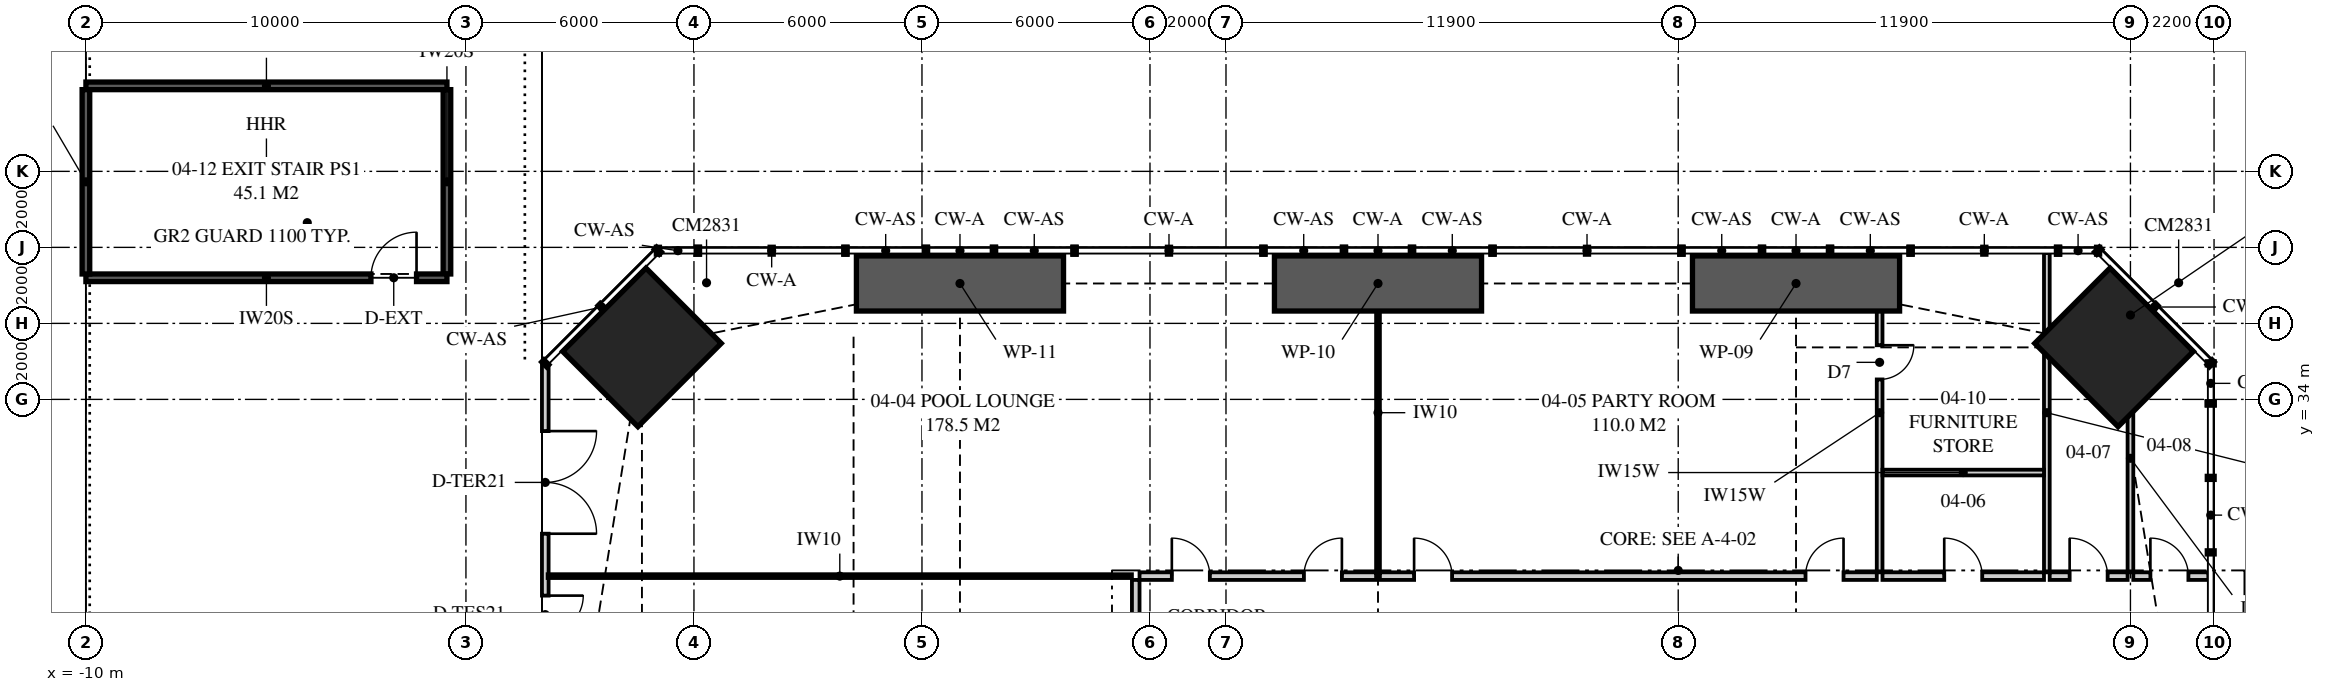
"""IFC4 building model, lengths in metres.
Left out: names, types, materials, properties, quantities, classifications, styles, units other than length and angle.
Written with IfcOpenShell. Run it as: python <this file> out.ifc"""

import sys

from ifc_helpers import new_model, si_unit, direction, frame, frame_2d, origin, origin_2d, place, context, subcontext, project, spatial, polyline, rectangle, outline, extrude, element, fill, save


model = new_model("IFC4")
c1 = context("Model", 3, precision=1e-05, world=origin(), true_north=direction((0.0, 1.0)))
c2 = subcontext(c1, "Body", "Model", "MODEL_VIEW")
j1 = project(units=[si_unit("LENGTHUNIT", "METRE"), si_unit("PLANEANGLEUNIT", "RADIAN")], contexts=[c1])
p1 = place(None, origin())
s1 = spatial("IfcSite", under=j1, at=p1, CompositionType="ELEMENT")
p2 = place(p1, origin())
s2 = spatial("IfcBuilding", under=s1, at=p2, CompositionType="ELEMENT")
p3 = place(p2, frame((0.0, 0.0, 21.0)))
s3 = spatial("IfcBuildingStorey", under=s2, at=p3, CompositionType="ELEMENT", Elevation=21.0)
for number, where, z_axis, x_axis in (
    (1, (43.369, 35.369, 0.0), (0.0, 0.0, 1.0), (-0.707, -0.707, 0.0)),
    (2, (4.631, 35.369, 0.0), (0.0, 0.0, 1.0), (0.707, -0.707, 0.0)),
):
    element("IfcColumn", number, at=place(p3, frame(where, z_axis=z_axis, x_axis=x_axis)), inside=s3, PredefinedType="COLUMN", context=c2, shape_type="SweptSolid", body=[
        extrude(rectangle(XDim=2.8, YDim=3.1, at=origin_2d()), origin(), (0.0, 0.0, 1.0), 3.35),
    ])
p4 = place(p3, frame((2.087, 34.949, 0.0), z_axis=(0.0, 0.0, 1.0), x_axis=(0.0, -1.0, 0.0)))
e3 = element("IfcWall", 3, at=p4, inside=s3, PredefinedType="SOLIDWALL", context=c2, shape_type="SweptSolid", body=[
    extrude(outline(polyline([(0.0, 0.0), (31.897, 0.0), (31.897, 3.11), (22.167, 3.11), (22.167, 2.15), (22.074, 2.15), (22.074, 3.11), (21.949, 3.11), (21.949, 2.15), (9.949, 2.15), (9.949, 3.11), (9.823, 3.11), (9.823, 2.15), (9.73, 2.15), (9.73, 3.11), (0.0, 3.11), (0.0, 0.0)])), frame((0.0, 0.087, 0.0), z_axis=(0.0, -1.0, 0.0), x_axis=(1.0, 0.0, 0.0)), (0.0, 0.0, 1.0), 0.175),
])
p5 = place(p4, frame((1.783, 0.0, 0.0)))
e4 = element("IfcOpeningElement", 4, at=p5, cuts=e3, PredefinedType="OPENING", context=c2, shape_type="SweptSolid", body=[
    extrude(rectangle(XDim=2.7, YDim=2.1, at=frame_2d((1.35, 1.05))), frame((0.0, 0.097, 0.0), z_axis=(0.0, -1.0, 0.0), x_axis=(1.0, 0.0, 0.0)), (0.0, 0.0, 1.0), 0.195),
])
p6 = place(p4, frame((6.112, 0.0, 0.0)))
e5 = element("IfcOpeningElement", 5, at=p6, cuts=e3, PredefinedType="OPENING", context=c2, shape_type="SweptSolid", body=[
    extrude(rectangle(XDim=1.0, YDim=2.1, at=frame_2d((0.5, 1.05))), frame((0.0, 0.097, 0.0), z_axis=(0.0, -1.0, 0.0), x_axis=(1.0, 0.0, 0.0)), (0.0, 0.0, 1.0), 0.195),
])
p7 = place(p4, frame((12.788, 0.0, 0.4)))
e6 = element("IfcOpeningElement", 6, at=p7, cuts=e3, PredefinedType="OPENING", context=c2, shape_type="SweptSolid", body=[
    extrude(rectangle(XDim=1.2, YDim=1.7, at=frame_2d((0.6, 0.85))), frame((0.0, 0.097, 0.0), z_axis=(0.0, -1.0, 0.0), x_axis=(1.0, 0.0, 0.0)), (0.0, 0.0, 1.0), 0.195),
])
p8 = place(p4, frame((14.949, 0.0, 0.4)))
e7 = element("IfcOpeningElement", 7, at=p8, cuts=e3, PredefinedType="OPENING", context=c2, shape_type="SweptSolid", body=[
    extrude(rectangle(XDim=3.0, YDim=1.7, at=frame_2d((1.5, 0.85))), frame((0.0, 0.097, 0.0), z_axis=(0.0, -1.0, 0.0), x_axis=(1.0, 0.0, 0.0)), (0.0, 0.0, 1.0), 0.195),
])
p9 = place(p4, frame((24.795, 0.0, 0.4)))
e8 = element("IfcOpeningElement", 8, at=p9, cuts=e3, PredefinedType="OPENING", context=c2, shape_type="SweptSolid", body=[
    extrude(rectangle(XDim=1.8, YDim=1.7, at=frame_2d((0.9, 0.85))), frame((0.0, 0.097, 0.0), z_axis=(0.0, -1.0, 0.0), x_axis=(1.0, 0.0, 0.0)), (0.0, 0.0, 1.0), 0.195),
])
p10 = place(p4, frame((29.123, 0.0, 0.0)))
e9 = element("IfcOpeningElement", 9, at=p10, cuts=e3, PredefinedType="OPENING", context=c2, shape_type="SweptSolid", body=[
    extrude(rectangle(XDim=1.0, YDim=2.1, at=frame_2d((0.5, 1.05))), frame((0.0, 0.097, 0.0), z_axis=(0.0, -1.0, 0.0), x_axis=(1.0, 0.0, 0.0)), (0.0, 0.0, 1.0), 0.195),
])
p11 = place(p3, frame((17.725, 29.35, 0.0), z_axis=(0.0, 0.0, 1.0), x_axis=(1.0, 0.0, 0.0)))
e10 = element("IfcWall", 10, at=p11, inside=s3, PredefinedType="PARTITIONING", context=c2, shape_type="SweptSolid", body=[
    extrude(outline(polyline([(0.0, 0.0), (6.225, 0.0), (6.225, 3.11), (6.225, 2.541), (5.938, 2.541), (5.938, 3.11), (0.0, 3.11), (0.0, 0.0)])), frame((0.0, 0.1, 0.0), z_axis=(0.0, -1.0, 0.0), x_axis=(1.0, 0.0, 0.0)), (0.0, 0.0, 1.0), 0.2),
])
p12 = place(p11, frame((0.85, 0.0, 0.0)))
e11 = element("IfcOpeningElement", 11, at=p12, cuts=e10, PredefinedType="OPENING", context=c2, shape_type="SweptSolid", body=[
    extrude(rectangle(XDim=1.0, YDim=2.1, at=frame_2d((0.5, 1.05))), frame((0.0, 0.11, 0.0), z_axis=(0.0, -1.0, 0.0), x_axis=(1.0, 0.0, 0.0)), (0.0, 0.0, 1.0), 0.22),
])
p13 = place(p11, frame((4.325, 0.0, 0.0)))
e12 = element("IfcOpeningElement", 12, at=p13, cuts=e10, PredefinedType="OPENING", context=c2, shape_type="SweptSolid", body=[
    extrude(rectangle(XDim=1.0, YDim=2.1, at=frame_2d((0.5, 1.05))), frame((0.0, 0.11, 0.0), z_axis=(0.0, -1.0, 0.0), x_axis=(1.0, 0.0, 0.0)), (0.0, 0.0, 1.0), 0.22),
])
p14 = place(p3, frame((24.05, 29.35, 0.0), z_axis=(0.0, 0.0, 1.0), x_axis=(1.0, 0.0, 0.0)))
e13 = element("IfcWall", 13, at=p14, inside=s3, PredefinedType="PARTITIONING", context=c2, shape_type="SweptSolid", body=[
    extrude(outline(polyline([(0.0, 0.0), (13.075, 0.0), (13.075, 3.11), (11.287, 3.11), (11.287, 2.541), (10.613, 2.541), (10.613, 3.11), (0.287, 3.11), (0.287, 2.541), (0.0, 2.541), (0.0, 3.11), (0.0, 0.0)])), frame((0.0, 0.1, 0.0), z_axis=(0.0, -1.0, 0.0), x_axis=(1.0, 0.0, 0.0)), (0.0, 0.0, 1.0), 0.2),
])
p15 = place(p14, frame((0.9, 0.0, 0.0)))
e14 = element("IfcOpeningElement", 14, at=p15, cuts=e13, PredefinedType="OPENING", context=c2, shape_type="SweptSolid", body=[
    extrude(rectangle(XDim=1.0, YDim=2.1, at=frame_2d((0.5, 1.05))), frame((0.0, 0.11, 0.0), z_axis=(0.0, -1.0, 0.0), x_axis=(1.0, 0.0, 0.0)), (0.0, 0.0, 1.0), 0.22),
])
p16 = place(p14, frame((11.2, 0.0, 0.0)))
e15 = element("IfcOpeningElement", 15, at=p16, cuts=e13, PredefinedType="OPENING", context=c2, shape_type="SweptSolid", body=[
    extrude(rectangle(XDim=1.0, YDim=2.1, at=frame_2d((0.5, 1.05))), frame((0.0, 0.11, 0.0), z_axis=(0.0, -1.0, 0.0), x_axis=(1.0, 0.0, 0.0)), (0.0, 0.0, 1.0), 0.22),
])
p17 = place(p3, frame((37.275, 29.35, 0.0), z_axis=(0.0, 0.0, 1.0), x_axis=(1.0, 0.0, 0.0)))
e16 = element("IfcWall", 16, at=p17, inside=s3, PredefinedType="PARTITIONING", context=c2, shape_type="SweptSolid", body=[
    extrude(rectangle(XDim=4.25, YDim=0.2, at=frame_2d((2.125, 0.0))), origin(), (0.0, 0.0, 1.0), 3.11),
])
p18 = place(p17, frame((1.625, 0.0, 0.0)))
e17 = element("IfcOpeningElement", 17, at=p18, cuts=e16, PredefinedType="OPENING", context=c2, shape_type="SweptSolid", body=[
    extrude(rectangle(XDim=1.0, YDim=2.1, at=frame_2d((0.5, 1.05))), frame((0.0, 0.11, 0.0), z_axis=(0.0, -1.0, 0.0), x_axis=(1.0, 0.0, 0.0)), (0.0, 0.0, 1.0), 0.22),
])
p19 = place(p3, frame((41.675, 29.35, 0.0), z_axis=(0.0, 0.0, 1.0), x_axis=(1.0, 0.0, 0.0)))
e18 = element("IfcWall", 18, at=p19, inside=s3, PredefinedType="PARTITIONING", context=c2, shape_type="SweptSolid", body=[
    extrude(outline(polyline([(0.0, 0.0), (2.05, 0.0), (2.05, 3.11), (2.05, 2.15), (1.748, 2.15), (1.748, 3.11), (0.0, 3.11), (0.0, 0.0)])), frame((0.0, 0.1, 0.0), z_axis=(0.0, -1.0, 0.0), x_axis=(1.0, 0.0, 0.0)), (0.0, 0.0, 1.0), 0.2),
])
p20 = place(p19, frame((0.525, 0.0, 0.0)))
e19 = element("IfcOpeningElement", 19, at=p20, cuts=e18, PredefinedType="OPENING", context=c2, shape_type="SweptSolid", body=[
    extrude(rectangle(XDim=1.0, YDim=2.1, at=frame_2d((0.5, 1.05))), frame((0.0, 0.11, 0.0), z_axis=(0.0, -1.0, 0.0), x_axis=(1.0, 0.0, 0.0)), (0.0, 0.0, 1.0), 0.22),
])
p21 = place(p3, frame((43.875, 29.35, 0.0), z_axis=(0.0, 0.0, 1.0), x_axis=(1.0, 0.0, 0.0)))
e20 = element("IfcWall", 20, at=p21, inside=s3, PredefinedType="PARTITIONING", context=c2, shape_type="SweptSolid", body=[
    extrude(outline(polyline([(0.0, 0.0), (1.975, 0.0), (1.975, 3.11), (1.392, 3.11), (1.392, 2.15), (0.0, 2.15), (0.0, 3.11), (0.0, 0.0)])), frame((0.0, 0.1, 0.0), z_axis=(0.0, -1.0, 0.0), x_axis=(1.0, 0.0, 0.0)), (0.0, 0.0, 1.0), 0.2),
])
p22 = place(p21, frame((0.45, 0.0, 0.0)))
e21 = element("IfcOpeningElement", 21, at=p22, cuts=e20, PredefinedType="OPENING", context=c2, shape_type="SweptSolid", body=[
    extrude(rectangle(XDim=1.0, YDim=2.1, at=frame_2d((0.5, 1.05))), frame((0.0, 0.11, 0.0), z_axis=(0.0, -1.0, 0.0), x_axis=(1.0, 0.0, 0.0)), (0.0, 0.0, 1.0), 0.22),
])
p23 = place(p3, frame((17.625, 27.7, 0.0), z_axis=(0.0, 0.0, 1.0), x_axis=(0.0, 1.0, 0.0)))
e22 = element("IfcWall", 22, at=p23, inside=s3, PredefinedType="PARTITIONING", context=c2, shape_type="SweptSolid", body=[
    extrude(rectangle(XDim=1.55, YDim=0.2, at=frame_2d((0.775, 0.0))), origin(), (0.0, 0.0, 1.0), 3.11),
])
p24 = place(p3, frame((24.0, 29.45, 0.0), z_axis=(0.0, 0.0, 1.0), x_axis=(0.0, 1.0, 0.0)))
e23 = element("IfcWall", 23, at=p24, inside=s3, PredefinedType="PARTITIONING", context=c2, shape_type="SweptSolid", body=[
    extrude(outline(polyline([(0.0, 0.0), (8.4, 0.0), (8.4, 2.15), (6.8, 2.15), (6.8, 2.541), (0.0, 2.541), (0.0, 0.0)])), frame((0.0, 0.05, 0.0), z_axis=(0.0, -1.0, 0.0), x_axis=(1.0, 0.0, 0.0)), (0.0, 0.0, 1.0), 0.1),
])
p25 = place(p3, frame((2.15, 29.35, 0.0), z_axis=(0.0, 0.0, 1.0), x_axis=(1.0, 0.0, 0.0)))
e24 = element("IfcWall", 24, at=p25, inside=s3, PredefinedType="PARTITIONING", context=c2, shape_type="SweptSolid", body=[
    extrude(outline(polyline([(0.0, 0.0), (15.375, 0.0), (15.375, 3.11), (11.137, 3.11), (11.137, 2.541), (10.562, 2.541), (10.562, 3.11), (9.31, 3.11), (9.31, 2.51), (6.79, 2.51), (6.79, 3.11), (2.769, 3.11), (2.769, 2.541), (2.377, 2.541), (2.377, 2.15), (0.634, 2.15), (0.634, 3.11), (0.0, 3.11), (0.0, 0.0)])), frame((0.0, 0.05, 0.0), z_axis=(0.0, -1.0, 0.0), x_axis=(1.0, 0.0, 0.0)), (0.0, 0.0, 1.0), 0.1),
])
p26 = place(p3, frame((37.2, 29.45, 0.0), z_axis=(0.0, 0.0, 1.0), x_axis=(0.0, 1.0, 0.0)))
e25 = element("IfcWall", 25, at=p26, inside=s3, PredefinedType="PLUMBINGWALL", context=c2, shape_type="SweptSolid", body=[
    extrude(outline(polyline([(0.0, 0.0), (8.4, 0.0), (8.4, 3.11), (8.061, 3.11), (8.061, 2.15), (6.327, 2.15), (6.327, 2.51), (4.634, 2.51), (4.634, 3.11), (0.0, 3.11), (0.0, 0.0)])), frame((0.0, 0.075, 0.0), z_axis=(0.0, -1.0, 0.0), x_axis=(1.0, 0.0, 0.0)), (0.0, 0.0, 1.0), 0.15),
])
p27 = place(p26, frame((5.075, 0.0, 0.0)))
e26 = element("IfcOpeningElement", 26, at=p27, cuts=e25, PredefinedType="OPENING", context=c2, shape_type="SweptSolid", body=[
    extrude(rectangle(XDim=0.9, YDim=2.1, at=frame_2d((0.45, 1.05))), frame((0.0, 0.085, 0.0), z_axis=(0.0, -1.0, 0.0), x_axis=(1.0, 0.0, 0.0)), (0.0, 0.0, 1.0), 0.17),
])
p28 = place(p3, frame((41.6, 29.45, 0.0), z_axis=(0.0, 0.0, 1.0), x_axis=(0.0, 1.0, 0.0)))
e27 = element("IfcWall", 27, at=p28, inside=s3, PredefinedType="PLUMBINGWALL", context=c2, shape_type="SweptSolid", body=[
    extrude(outline(polyline([(0.0, 0.0), (8.4, 0.0), (8.4, 3.11), (7.204, 3.11), (7.204, 2.51), (7.105, 2.51), (7.105, 2.15), (5.443, 2.15), (5.443, 2.51), (4.634, 2.51), (4.634, 3.11), (0.0, 3.11), (0.0, 0.0)])), frame((0.0, 0.075, 0.0), z_axis=(0.0, -1.0, 0.0), x_axis=(1.0, 0.0, 0.0)), (0.0, 0.0, 1.0), 0.15),
])
p29 = place(p3, frame((43.8, 29.45, 0.0), z_axis=(0.0, 0.0, 1.0), x_axis=(0.0, 1.0, 0.0)))
e28 = element("IfcWall", 28, at=p29, inside=s3, PredefinedType="PLUMBINGWALL", context=c2, shape_type="SweptSolid", body=[
    extrude(rectangle(XDim=6.001, YDim=0.15, at=frame_2d((3.0, 0.0))), origin(), (0.0, 0.0, 1.0), 2.15),
])
p30 = place(p3, frame((43.8, 35.451, 0.0), z_axis=(0.0, 0.0, 1.0), x_axis=(0.0, 1.0, 0.0)))
e29 = element("IfcWall", 29, at=p30, inside=s3, PredefinedType="PLUMBINGWALL", context=c2, shape_type="SweptSolid", body=[
    extrude(outline(polyline([(0.0, 0.0), (1.537, 0.0), (1.537, 3.11), (0.074, 3.11), (0.074, 2.15), (0.0, 2.15), (0.0, 0.0)])), frame((0.0, 0.075, 0.0), z_axis=(0.0, -1.0, 0.0), x_axis=(1.0, 0.0, 0.0)), (0.0, 0.0, 1.0), 0.15),
])
p31 = place(p3, frame((37.275, 32.075, 0.0), z_axis=(0.0, 0.0, 1.0), x_axis=(1.0, 0.0, 0.0)))
e30 = element("IfcWall", 30, at=p31, inside=s3, PredefinedType="PLUMBINGWALL", context=c2, shape_type="SweptSolid", body=[
    extrude(rectangle(XDim=4.25, YDim=0.15, at=frame_2d((2.125, 0.0))), origin(), (0.0, 0.0, 1.0), 3.11),
])
p32 = place(p3, frame((-10.0, 37.2, 0.0), z_axis=(0.0, 0.0, 1.0), x_axis=(1.0, 0.0, 0.0)))
e31 = element("IfcWall", 31, at=p32, inside=s3, PredefinedType="SOLIDWALL", context=c2, shape_type="SweptSolid", body=[
    extrude(rectangle(XDim=9.5, YDim=0.2, at=frame_2d((4.75, 0.0))), origin(), (0.0, 0.0, 1.0), 3.0),
])
p33 = place(p32, frame((7.5, 0.0, 0.0)))
e32 = element("IfcOpeningElement", 32, at=p33, cuts=e31, PredefinedType="OPENING", context=c2, shape_type="SweptSolid", body=[
    extrude(rectangle(XDim=1.2, YDim=2.1, at=frame_2d((0.6, 1.05))), frame((0.0, 0.11, 0.0), z_axis=(0.0, -1.0, 0.0), x_axis=(1.0, 0.0, 0.0)), (0.0, 0.0, 1.0), 0.22),
])
p34 = place(p3, frame((-0.5, 37.3, 0.0), z_axis=(0.0, 0.0, 1.0), x_axis=(0.0, 1.0, 0.0)))
e33 = element("IfcWall", 33, at=p34, inside=s3, PredefinedType="SOLIDWALL", context=c2, shape_type="SweptSolid", body=[
    extrude(rectangle(XDim=4.85, YDim=0.2, at=frame_2d((2.425, 0.0))), origin(), (0.0, 0.0, 1.0), 3.0),
])
p35 = place(p3, frame((-0.5, 42.25, 0.0), z_axis=(0.0, 0.0, 1.0), x_axis=(-1.0, 0.0, 0.0)))
e34 = element("IfcWall", 34, at=p35, inside=s3, PredefinedType="SOLIDWALL", context=c2, shape_type="SweptSolid", body=[
    extrude(rectangle(XDim=9.5, YDim=0.2, at=frame_2d((4.75, 0.0))), origin(), (0.0, 0.0, 1.0), 3.0),
])
p36 = place(p3, frame((-10.0, 42.15, 0.0), z_axis=(0.0, 0.0, 1.0), x_axis=(0.0, -1.0, 0.0)))
e35 = element("IfcWall", 35, at=p36, inside=s3, PredefinedType="SOLIDWALL", context=c2, shape_type="SweptSolid", body=[
    extrude(rectangle(XDim=4.85, YDim=0.2, at=frame_2d((2.425, 0.0))), origin(), (0.0, 0.0, 1.0), 3.0),
])
for number, where, z_axis, x_axis in (
    (36, (32.275, 37.05, 0.0), (0.0, 0.0, 1.0), (1.0, 0.0, 0.0)),
    (37, (21.275, 37.05, 0.0), (0.0, 0.0, 1.0), (1.0, 0.0, 0.0)),
    (38, (10.275, 37.05, 0.0), (0.0, 0.0, 1.0), (1.0, 0.0, 0.0)),
):
    element("IfcWall", number, at=place(p3, frame(where, z_axis=z_axis, x_axis=x_axis)), inside=s3, PredefinedType="SHEAR", context=c2, shape_type="SweptSolid", body=[
        extrude(rectangle(XDim=5.45, YDim=1.45, at=frame_2d((2.725, 0.0))), origin(), (0.0, 0.0, 1.0), 3.35),
    ])
p37 = place(p5, origin())
e39 = element("IfcDoor", 39, at=p37, inside=s3, OperationType="DOUBLE_DOOR_SINGLE_SWING", PredefinedType="DOOR", context=c2, shape_type="SweptSolid", body=[
    extrude(rectangle(XDim=2.7, YDim=2.1, at=frame_2d((1.35, 1.05))), frame((0.0, 0.025, 0.0), z_axis=(0.0, -1.0, 0.0), x_axis=(1.0, 0.0, 0.0)), (0.0, 0.0, 1.0), 0.05),
])
fill(e4, e39)
p38 = place(p6, origin())
e40 = element("IfcDoor", 40, at=p38, inside=s3, OperationType="SINGLE_SWING_LEFT", PredefinedType="DOOR", context=c2, shape_type="SweptSolid", body=[
    extrude(rectangle(XDim=1.0, YDim=2.1, at=frame_2d((0.5, 1.05))), frame((0.0, 0.025, 0.0), z_axis=(0.0, -1.0, 0.0), x_axis=(1.0, 0.0, 0.0)), (0.0, 0.0, 1.0), 0.05),
])
fill(e5, e40)
p39 = place(p12, origin())
e41 = element("IfcDoor", 41, at=p39, inside=s3, OperationType="SINGLE_SWING_LEFT", PredefinedType="DOOR", context=c2, shape_type="SweptSolid", body=[
    extrude(rectangle(XDim=1.0, YDim=2.1, at=frame_2d((0.5, 1.05))), frame((0.0, 0.025, 0.0), z_axis=(0.0, -1.0, 0.0), x_axis=(1.0, 0.0, 0.0)), (0.0, 0.0, 1.0), 0.05),
])
fill(e11, e41)
p40 = place(p13, origin())
e42 = element("IfcDoor", 42, at=p40, inside=s3, OperationType="SINGLE_SWING_RIGHT", PredefinedType="DOOR", context=c2, shape_type="SweptSolid", body=[
    extrude(rectangle(XDim=1.0, YDim=2.1, at=frame_2d((0.5, 1.05))), frame((0.0, 0.025, 0.0), z_axis=(0.0, -1.0, 0.0), x_axis=(1.0, 0.0, 0.0)), (0.0, 0.0, 1.0), 0.05),
])
fill(e12, e42)
p41 = place(p15, origin())
e43 = element("IfcDoor", 43, at=p41, inside=s3, OperationType="SINGLE_SWING_LEFT", PredefinedType="DOOR", context=c2, shape_type="SweptSolid", body=[
    extrude(rectangle(XDim=1.0, YDim=2.1, at=frame_2d((0.5, 1.05))), frame((0.0, 0.025, 0.0), z_axis=(0.0, -1.0, 0.0), x_axis=(1.0, 0.0, 0.0)), (0.0, 0.0, 1.0), 0.05),
])
fill(e14, e43)
p42 = place(p16, origin())
e44 = element("IfcDoor", 44, at=p42, inside=s3, OperationType="SINGLE_SWING_RIGHT", PredefinedType="DOOR", context=c2, shape_type="SweptSolid", body=[
    extrude(rectangle(XDim=1.0, YDim=2.1, at=frame_2d((0.5, 1.05))), frame((0.0, 0.025, 0.0), z_axis=(0.0, -1.0, 0.0), x_axis=(1.0, 0.0, 0.0)), (0.0, 0.0, 1.0), 0.05),
])
fill(e15, e44)
p43 = place(p18, origin())
e45 = element("IfcDoor", 45, at=p43, inside=s3, OperationType="SINGLE_SWING_LEFT", PredefinedType="DOOR", context=c2, shape_type="SweptSolid", body=[
    extrude(rectangle(XDim=1.0, YDim=2.1, at=frame_2d((0.5, 1.05))), frame((0.0, 0.025, 0.0), z_axis=(0.0, -1.0, 0.0), x_axis=(1.0, 0.0, 0.0)), (0.0, 0.0, 1.0), 0.05),
])
fill(e17, e45)
p44 = place(p20, origin())
e46 = element("IfcDoor", 46, at=p44, inside=s3, OperationType="SINGLE_SWING_LEFT", PredefinedType="DOOR", context=c2, shape_type="SweptSolid", body=[
    extrude(rectangle(XDim=1.0, YDim=2.1, at=frame_2d((0.5, 1.05))), frame((0.0, 0.025, 0.0), z_axis=(0.0, -1.0, 0.0), x_axis=(1.0, 0.0, 0.0)), (0.0, 0.0, 1.0), 0.05),
])
fill(e19, e46)
p45 = place(p22, origin())
e47 = element("IfcDoor", 47, at=p45, inside=s3, OperationType="SINGLE_SWING_LEFT", PredefinedType="DOOR", context=c2, shape_type="SweptSolid", body=[
    extrude(rectangle(XDim=1.0, YDim=2.1, at=frame_2d((0.5, 1.05))), frame((0.0, 0.025, 0.0), z_axis=(0.0, -1.0, 0.0), x_axis=(1.0, 0.0, 0.0)), (0.0, 0.0, 1.0), 0.05),
])
fill(e21, e47)
p46 = place(p27, frame((0.9, 0.0, 0.0), z_axis=(0.0, 0.0, 1.0), x_axis=(-1.0, 0.0, 0.0)))
e48 = element("IfcDoor", 48, at=p46, inside=s3, OperationType="SINGLE_SWING_LEFT", PredefinedType="DOOR", context=c2, shape_type="SweptSolid", body=[
    extrude(rectangle(XDim=0.9, YDim=2.1, at=frame_2d((0.45, 1.05))), frame((0.0, 0.025, 0.0), z_axis=(0.0, -1.0, 0.0), x_axis=(1.0, 0.0, 0.0)), (0.0, 0.0, 1.0), 0.05),
])
fill(e26, e48)
p47 = place(p33, origin())
e49 = element("IfcDoor", 49, at=p47, inside=s3, OperationType="SINGLE_SWING_RIGHT", PredefinedType="DOOR", context=c2, shape_type="SweptSolid", body=[
    extrude(rectangle(XDim=1.2, YDim=2.1, at=frame_2d((0.6, 1.05))), frame((0.0, 0.025, 0.0), z_axis=(0.0, -1.0, 0.0), x_axis=(1.0, 0.0, 0.0)), (0.0, 0.0, 1.0), 0.05),
])
fill(e32, e49)
save(model, sys.argv[1])
